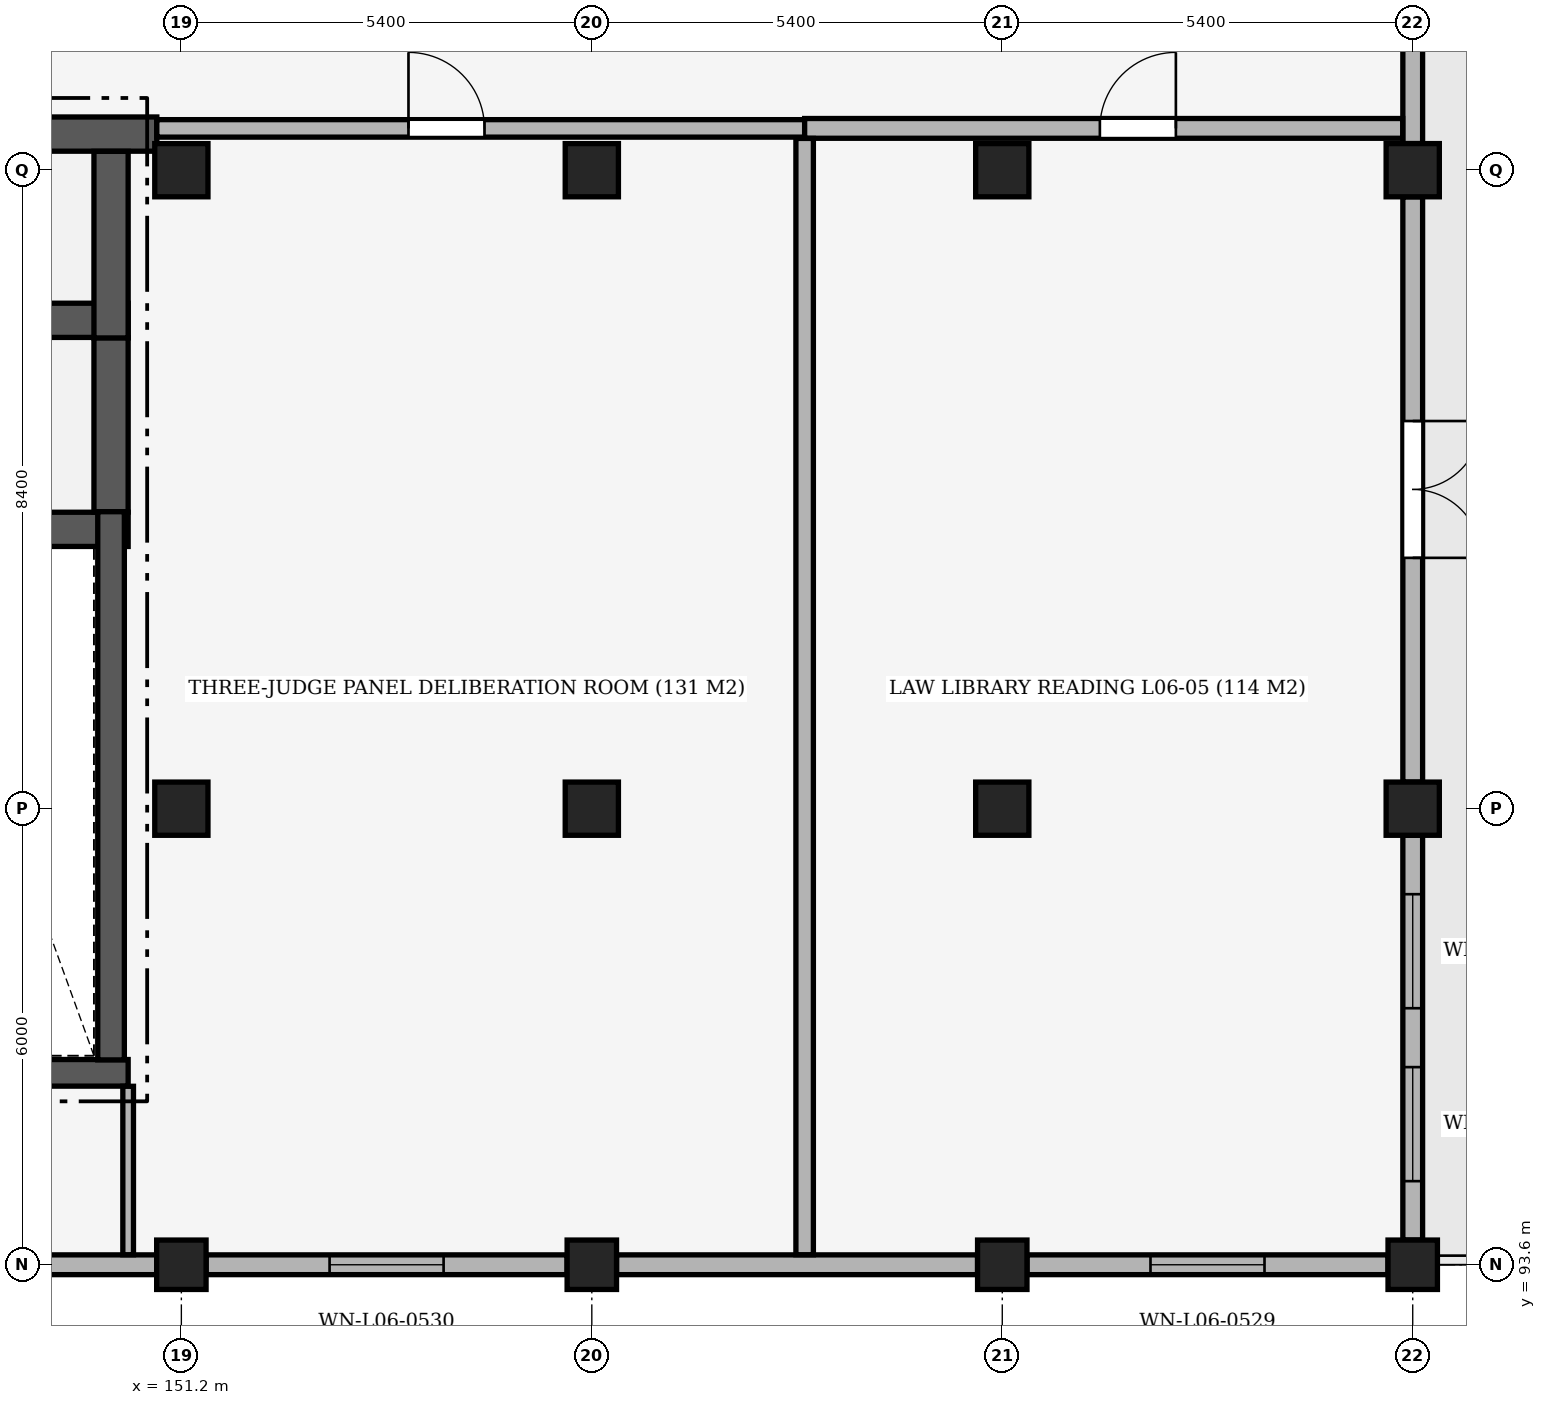
"""IFC4 building model, lengths in metres.
Left out: names, types, materials, properties, quantities, classifications, styles, units other than length and angle.
Written with IfcOpenShell. Run it as: python <this file> out.ifc"""

import sys

from ifc_helpers import new_model, si_unit, direction, frame, frame_2d, origin, origin_2d, place, context, subcontext, project, spatial, rectangle, extrude, element, fill, save


model = new_model("IFC4")
c1 = context("Model", 3, precision=1e-05, world=origin(), true_north=direction((0.0, 1.0)))
c2 = subcontext(c1, "Body", "Model", "MODEL_VIEW")
j1 = project(units=[si_unit("LENGTHUNIT", "METRE"), si_unit("PLANEANGLEUNIT", "RADIAN")], contexts=[c1])
p1 = place(None, origin())
s1 = spatial("IfcSite", under=j1, at=p1, CompositionType="ELEMENT")
p2 = place(p1, origin())
s2 = spatial("IfcBuilding", under=s1, at=p2, CompositionType="ELEMENT")
p3 = place(p2, frame((0.0, 0.0, 29.4)))
s3 = spatial("IfcBuildingStorey", under=s2, at=p3, CompositionType="ELEMENT", Elevation=29.4)
p4 = place(p3, frame((151.2, 93.6, 0.0), z_axis=(0.0, 0.0, 1.0), x_axis=(1.0, 0.0, 0.0)))
e1 = element("IfcColumn", 1, at=p4, inside=s3, PredefinedType="COLUMN", context=c2, shape_type="SweptSolid", body=[
    extrude(rectangle(XDim=0.65, YDim=0.65, at=origin_2d()), origin(), (0.0, 0.0, 1.0), 4.2),
])
for number, where, z_axis, x_axis in (
    (2, (151.2, 99.6, 0.0), (0.0, 0.0, 1.0), (1.0, 0.0, 0.0)),
    (3, (151.2, 108.0, 0.0), (0.0, 0.0, 1.0), (1.0, 0.0, 0.0)),
):
    element("IfcColumn", number, at=place(p3, frame(where, z_axis=z_axis, x_axis=x_axis)), inside=s3, PredefinedType="COLUMN", context=c2, shape_type="SweptSolid", body=[
        extrude(rectangle(XDim=0.7, YDim=0.7, at=origin_2d()), origin(), (0.0, 0.0, 1.0), 4.2),
    ])
p5 = place(p3, frame((156.6, 93.6, 0.0), z_axis=(0.0, 0.0, 1.0), x_axis=(1.0, 0.0, 0.0)))
e4 = element("IfcColumn", 4, at=p5, inside=s3, PredefinedType="COLUMN", context=c2, shape_type="SweptSolid", body=[
    extrude(rectangle(XDim=0.65, YDim=0.65, at=origin_2d()), origin(), (0.0, 0.0, 1.0), 4.2),
])
for number, where, z_axis, x_axis in (
    (5, (156.6, 99.6, 0.0), (0.0, 0.0, 1.0), (1.0, 0.0, 0.0)),
    (6, (156.6, 108.0, 0.0), (0.0, 0.0, 1.0), (1.0, 0.0, 0.0)),
):
    element("IfcColumn", number, at=place(p3, frame(where, z_axis=z_axis, x_axis=x_axis)), inside=s3, PredefinedType="COLUMN", context=c2, shape_type="SweptSolid", body=[
        extrude(rectangle(XDim=0.7, YDim=0.7, at=origin_2d()), origin(), (0.0, 0.0, 1.0), 4.2),
    ])
p6 = place(p3, frame((162.0, 93.6, 0.0), z_axis=(0.0, 0.0, 1.0), x_axis=(1.0, 0.0, 0.0)))
e7 = element("IfcColumn", 7, at=p6, inside=s3, PredefinedType="COLUMN", context=c2, shape_type="SweptSolid", body=[
    extrude(rectangle(XDim=0.65, YDim=0.65, at=origin_2d()), origin(), (0.0, 0.0, 1.0), 4.2),
])
for number, where, z_axis, x_axis in (
    (8, (162.0, 99.6, 0.0), (0.0, 0.0, 1.0), (1.0, 0.0, 0.0)),
    (9, (162.0, 108.0, 0.0), (0.0, 0.0, 1.0), (1.0, 0.0, 0.0)),
):
    element("IfcColumn", number, at=place(p3, frame(where, z_axis=z_axis, x_axis=x_axis)), inside=s3, PredefinedType="COLUMN", context=c2, shape_type="SweptSolid", body=[
        extrude(rectangle(XDim=0.7, YDim=0.7, at=origin_2d()), origin(), (0.0, 0.0, 1.0), 4.2),
    ])
p7 = place(p3, frame((167.4, 93.6, 0.0), z_axis=(0.0, 0.0, 1.0), x_axis=(1.0, 0.0, 0.0)))
e10 = element("IfcColumn", 10, at=p7, inside=s3, PredefinedType="COLUMN", context=c2, shape_type="SweptSolid", body=[
    extrude(rectangle(XDim=0.65, YDim=0.65, at=origin_2d()), origin(), (0.0, 0.0, 1.0), 4.2),
])
for number, where, z_axis, x_axis in (
    (11, (167.4, 99.6, 0.0), (0.0, 0.0, 1.0), (1.0, 0.0, 0.0)),
    (12, (167.4, 108.0, 0.0), (0.0, 0.0, 1.0), (1.0, 0.0, 0.0)),
):
    element("IfcColumn", number, at=place(p3, frame(where, z_axis=z_axis, x_axis=x_axis)), inside=s3, PredefinedType="COLUMN", context=c2, shape_type="SweptSolid", body=[
        extrude(rectangle(XDim=0.7, YDim=0.7, at=origin_2d()), origin(), (0.0, 0.0, 1.0), 4.2),
    ])
p8 = place(p3, frame((167.4, 113.05, 0.0), z_axis=(0.0, 0.0, 1.0), x_axis=(0.0, -1.0, 0.0)))
e13 = element("IfcWall", 13, at=p8, inside=s3, PredefinedType="SOLIDWALL", context=c2, shape_type="SweptSolid", body=[
    extrude(rectangle(XDim=4.7, YDim=0.26, at=frame_2d((2.35, 0.0))), origin(), (0.0, 0.0, 1.0), 3.4),
])
p9 = place(p3, frame((167.4, 107.65, 0.0), z_axis=(0.0, 0.0, 1.0), x_axis=(0.0, -1.0, 0.0)))
e14 = element("IfcWall", 14, at=p9, inside=s3, PredefinedType="SOLIDWALL", context=c2, shape_type="SweptSolid", body=[
    extrude(rectangle(XDim=7.7, YDim=0.26, at=frame_2d((3.85, 0.0))), origin(), (0.0, 0.0, 1.0), 3.25),
])
p10 = place(p9, frame((2.95, 0.0, 0.0)))
e15 = element("IfcOpeningElement", 15, at=p10, cuts=e14, PredefinedType="OPENING", context=c2, shape_type="SweptSolid", body=[
    extrude(rectangle(XDim=1.8, YDim=2.2, at=frame_2d((0.9, 1.1))), frame((0.0, 0.145, 0.0), z_axis=(0.0, -1.0, 0.0), x_axis=(1.0, 0.0, 0.0)), (0.0, 0.0, 1.0), 0.29),
])
p11 = place(p3, frame((167.4, 99.25, 0.0), z_axis=(0.0, 0.0, 1.0), x_axis=(0.0, -1.0, 0.0)))
e16 = element("IfcWall", 16, at=p11, inside=s3, PredefinedType="SOLIDWALL", context=c2, shape_type="SweptSolid", body=[
    extrude(rectangle(XDim=5.325, YDim=0.26, at=frame_2d((2.663, 0.0))), origin(), (0.0, 0.0, 1.0), 3.4),
])
p12 = place(p11, frame((0.775, 0.0, 0.9)))
e17 = element("IfcOpeningElement", 17, at=p12, cuts=e16, PredefinedType="OPENING", context=c2, shape_type="SweptSolid", body=[
    extrude(rectangle(XDim=1.5, YDim=2.1, at=frame_2d((0.75, 1.05))), frame((0.0, 0.145, 0.0), z_axis=(0.0, -1.0, 0.0), x_axis=(1.0, 0.0, 0.0)), (0.0, 0.0, 1.0), 0.29),
])
p13 = place(p11, frame((3.05, 0.0, 0.9)))
e18 = element("IfcOpeningElement", 18, at=p13, cuts=e16, PredefinedType="OPENING", context=c2, shape_type="SweptSolid", body=[
    extrude(rectangle(XDim=1.5, YDim=2.1, at=frame_2d((0.75, 1.05))), frame((0.0, 0.145, 0.0), z_axis=(0.0, -1.0, 0.0), x_axis=(1.0, 0.0, 0.0)), (0.0, 0.0, 1.0), 0.29),
])
p14 = place(p3, frame((167.075, 93.6, 0.0), z_axis=(0.0, 0.0, 1.0), x_axis=(-1.0, 0.0, 0.0)))
e19 = element("IfcWall", 19, at=p14, inside=s3, PredefinedType="SOLIDWALL", context=c2, shape_type="SweptSolid", body=[
    extrude(rectangle(XDim=4.75, YDim=0.26, at=frame_2d((2.375, 0.0))), origin(), (0.0, 0.0, 1.0), 3.35),
])
p15 = place(p14, frame((1.625, 0.0, 0.9)))
e20 = element("IfcOpeningElement", 20, at=p15, cuts=e19, PredefinedType="OPENING", context=c2, shape_type="SweptSolid", body=[
    extrude(rectangle(XDim=1.5, YDim=2.1, at=frame_2d((0.75, 1.05))), frame((0.0, 0.145, 0.0), z_axis=(0.0, -1.0, 0.0), x_axis=(1.0, 0.0, 0.0)), (0.0, 0.0, 1.0), 0.29),
])
p16 = place(p3, frame((161.675, 93.6, 0.0), z_axis=(0.0, 0.0, 1.0), x_axis=(-1.0, 0.0, 0.0)))
e21 = element("IfcWall", 21, at=p16, inside=s3, PredefinedType="SOLIDWALL", context=c2, shape_type="SweptSolid", body=[
    extrude(rectangle(XDim=4.75, YDim=0.26, at=frame_2d((2.375, 0.0))), origin(), (0.0, 0.0, 1.0), 3.35),
])
p17 = place(p3, frame((156.275, 93.6, 0.0), z_axis=(0.0, 0.0, 1.0), x_axis=(-1.0, 0.0, 0.0)))
e22 = element("IfcWall", 22, at=p17, inside=s3, PredefinedType="SOLIDWALL", context=c2, shape_type="SweptSolid", body=[
    extrude(rectangle(XDim=4.75, YDim=0.26, at=frame_2d((2.375, 0.0))), origin(), (0.0, 0.0, 1.0), 3.35),
])
p18 = place(p17, frame((1.625, 0.0, 0.9)))
e23 = element("IfcOpeningElement", 23, at=p18, cuts=e22, PredefinedType="OPENING", context=c2, shape_type="SweptSolid", body=[
    extrude(rectangle(XDim=1.5, YDim=2.1, at=frame_2d((0.75, 1.05))), frame((0.0, 0.145, 0.0), z_axis=(0.0, -1.0, 0.0), x_axis=(1.0, 0.0, 0.0)), (0.0, 0.0, 1.0), 0.29),
])
p19 = place(p3, frame((150.875, 93.6, 0.0), z_axis=(0.0, 0.0, 1.0), x_axis=(-1.0, 0.0, 0.0)))
e24 = element("IfcWall", 24, at=p19, inside=s3, PredefinedType="SOLIDWALL", context=c2, shape_type="SweptSolid", body=[
    extrude(rectangle(XDim=7.75, YDim=0.26, at=frame_2d((3.875, 0.0))), origin(), (0.0, 0.0, 1.0), 3.25),
])
p20 = place(p19, frame((1.517, 0.0, 1.05)))
e25 = element("IfcOpeningElement", 25, at=p20, cuts=e24, PredefinedType="OPENING", context=c2, shape_type="SweptSolid", body=[
    extrude(rectangle(XDim=1.6, YDim=1.8, at=frame_2d((0.8, 0.9))), frame((0.0, 0.145, 0.0), z_axis=(0.0, -1.0, 0.0), x_axis=(1.0, 0.0, 0.0)), (0.0, 0.0, 1.0), 0.29),
])
p21 = place(p19, frame((4.633, 0.0, 1.05)))
e26 = element("IfcOpeningElement", 26, at=p21, cuts=e24, PredefinedType="OPENING", context=c2, shape_type="SweptSolid", body=[
    extrude(rectangle(XDim=1.6, YDim=1.8, at=frame_2d((0.8, 0.9))), frame((0.0, 0.145, 0.0), z_axis=(0.0, -1.0, 0.0), x_axis=(1.0, 0.0, 0.0)), (0.0, 0.0, 1.0), 0.29),
])
p22 = place(p3, frame((147.618, 103.275, 0.0), z_axis=(0.0, 0.0, 1.0), x_axis=(1.0, 0.0, 0.0)))
e27 = element("IfcWall", 27, at=p22, inside=s3, PredefinedType="SHEAR", context=c2, shape_type="SweptSolid", body=[
    extrude(rectangle(XDim=2.882, YDim=0.45, at=frame_2d((1.441, 0.0))), origin(), (0.0, 0.0, 1.0), 3.95),
])
p23 = place(p3, frame((147.1, 106.025, 0.0), z_axis=(0.0, 0.0, 1.0), x_axis=(1.0, 0.0, 0.0)))
e28 = element("IfcWall", 28, at=p23, inside=s3, PredefinedType="SHEAR", context=c2, shape_type="SweptSolid", body=[
    extrude(rectangle(XDim=3.4, YDim=0.45, at=frame_2d((1.7, 0.0))), origin(), (0.0, 0.0, 1.0), 3.95),
])
p24 = place(p3, frame((150.275, 103.502, 0.0), z_axis=(0.0, 0.0, 1.0), x_axis=(0.0, 1.0, 0.0)))
e29 = element("IfcWall", 29, at=p24, inside=s3, PredefinedType="SHEAR", context=c2, shape_type="SweptSolid", body=[
    extrude(rectangle(XDim=2.296, YDim=0.45, at=frame_2d((1.148, 0.0))), origin(), (0.0, 0.0, 1.0), 3.95),
])
p25 = place(p3, frame((147.1, 108.475, 0.0), z_axis=(0.0, 0.0, 1.0), x_axis=(1.0, 0.0, 0.0)))
e30 = element("IfcWall", 30, at=p25, inside=s3, PredefinedType="SHEAR", context=c2, shape_type="SweptSolid", body=[
    extrude(rectangle(XDim=3.777, YDim=0.45, at=frame_2d((1.888, 0.0))), origin(), (0.0, 0.0, 1.0), 3.95),
])
p26 = place(p3, frame((150.275, 105.793, 0.0), z_axis=(0.0, 0.0, 1.0), x_axis=(0.0, 1.0, 0.0)))
e31 = element("IfcWall", 31, at=p26, inside=s3, PredefinedType="SHEAR", context=c2, shape_type="SweptSolid", body=[
    extrude(rectangle(XDim=2.455, YDim=0.45, at=frame_2d((1.228, 0.0))), origin(), (0.0, 0.0, 1.0), 3.95),
])
p27 = place(p3, frame((147.65, 96.125, 0.0), z_axis=(0.0, 0.0, 1.0), x_axis=(1.0, 0.0, 0.0)))
e32 = element("IfcWall", 32, at=p27, inside=s3, PredefinedType="SHEAR", context=c2, shape_type="SweptSolid", body=[
    extrude(rectangle(XDim=2.85, YDim=0.35, at=frame_2d((1.425, 0.0))), origin(), (0.0, 0.0, 1.0), 3.95),
])
p28 = place(p3, frame((150.275, 96.295, 0.0), z_axis=(0.0, 0.0, 1.0), x_axis=(0.0, 1.0, 0.0)))
e33 = element("IfcWall", 33, at=p28, inside=s3, PredefinedType="SHEAR", context=c2, shape_type="SweptSolid", body=[
    extrude(rectangle(XDim=7.212, YDim=0.35, at=frame_2d((3.606, 0.0))), origin(), (0.0, 0.0, 1.0), 3.95),
])
p29 = place(p3, frame((150.877, 108.55, 0.0), z_axis=(0.0, 0.0, 1.0), x_axis=(1.0, 0.0, 0.0)))
e34 = element("IfcWall", 34, at=p29, inside=s3, PredefinedType="SOLIDWALL", context=c2, shape_type="SweptSolid", body=[
    extrude(rectangle(XDim=8.523, YDim=0.23, at=frame_2d((4.261, 0.0))), origin(), (0.0, 0.0, 1.0), 3.4),
])
p30 = place(p29, frame((3.311, 0.0, 0.0)))
e35 = element("IfcOpeningElement", 35, at=p30, cuts=e34, PredefinedType="OPENING", context=c2, shape_type="SweptSolid", body=[
    extrude(rectangle(XDim=1.0, YDim=2.2, at=frame_2d((0.5, 1.1))), frame((0.0, 0.13, 0.0), z_axis=(0.0, -1.0, 0.0), x_axis=(1.0, 0.0, 0.0)), (0.0, 0.0, 1.0), 0.26),
])
p31 = place(p3, frame((159.4, 108.55, 0.0), z_axis=(0.0, 0.0, 1.0), x_axis=(1.0, 0.0, 0.0)))
e36 = element("IfcWall", 36, at=p31, inside=s3, PredefinedType="PARTITIONING", context=c2, shape_type="SweptSolid", body=[
    extrude(rectangle(XDim=7.868, YDim=0.26, at=frame_2d((3.934, 0.0))), origin(), (0.0, 0.0, 1.0), 3.4),
])
p32 = place(p31, frame((3.884, 0.0, 0.0)))
e37 = element("IfcOpeningElement", 37, at=p32, cuts=e36, PredefinedType="OPENING", context=c2, shape_type="SweptSolid", body=[
    extrude(rectangle(XDim=1.0, YDim=2.1, at=frame_2d((0.5, 1.05))), frame((0.0, 0.145, 0.0), z_axis=(0.0, -1.0, 0.0), x_axis=(1.0, 0.0, 0.0)), (0.0, 0.0, 1.0), 0.29),
])
p33 = place(p3, frame((150.5, 93.732, 0.0), z_axis=(0.0, 0.0, 1.0), x_axis=(0.0, 1.0, 0.0)))
e38 = element("IfcWall", 38, at=p33, inside=s3, PredefinedType="PARTITIONING", context=c2, shape_type="SweptSolid", body=[
    extrude(rectangle(XDim=2.216, YDim=0.14, at=frame_2d((1.108, 0.0))), origin(), (0.0, 0.0, 1.0), 3.25),
])
p34 = place(p3, frame((159.4, 93.732, 0.0), z_axis=(0.0, 0.0, 1.0), x_axis=(0.0, 1.0, 0.0)))
e39 = element("IfcWall", 39, at=p34, inside=s3, PredefinedType="SOLIDWALL", context=c2, shape_type="SweptSolid", body=[
    extrude(rectangle(XDim=14.686, YDim=0.23, at=frame_2d((7.343, 0.0))), origin(), (0.0, 0.0, 1.0), 3.35),
])
p35 = place(p10, origin())
e40 = element("IfcDoor", 40, at=p35, inside=s3, OperationType="DOUBLE_DOOR_SINGLE_SWING", PredefinedType="DOOR", context=c2, shape_type="SweptSolid", body=[
    extrude(rectangle(XDim=1.8, YDim=2.2, at=frame_2d((0.9, 1.1))), frame((0.0, 0.025, 0.0), z_axis=(0.0, -1.0, 0.0), x_axis=(1.0, 0.0, 0.0)), (0.0, 0.0, 1.0), 0.05),
])
fill(e15, e40)
p36 = place(p12, origin())
e41 = element("IfcWindow", 41, at=p36, inside=s3, PartitioningType="SINGLE_PANEL", PredefinedType="WINDOW", context=c2, shape_type="SweptSolid", body=[
    extrude(rectangle(XDim=1.5, YDim=2.1, at=frame_2d((0.75, 1.05))), frame((0.0, 0.03, 0.0), z_axis=(0.0, -1.0, 0.0), x_axis=(1.0, 0.0, 0.0)), (0.0, 0.0, 1.0), 0.06),
])
fill(e17, e41)
p37 = place(p13, origin())
e42 = element("IfcWindow", 42, at=p37, inside=s3, PartitioningType="SINGLE_PANEL", PredefinedType="WINDOW", context=c2, shape_type="SweptSolid", body=[
    extrude(rectangle(XDim=1.5, YDim=2.1, at=frame_2d((0.75, 1.05))), frame((0.0, 0.03, 0.0), z_axis=(0.0, -1.0, 0.0), x_axis=(1.0, 0.0, 0.0)), (0.0, 0.0, 1.0), 0.06),
])
fill(e18, e42)
p38 = place(p15, origin())
e43 = element("IfcWindow", 43, at=p38, inside=s3, PartitioningType="SINGLE_PANEL", PredefinedType="WINDOW", context=c2, shape_type="SweptSolid", body=[
    extrude(rectangle(XDim=1.5, YDim=2.1, at=frame_2d((0.75, 1.05))), frame((0.0, 0.03, 0.0), z_axis=(0.0, -1.0, 0.0), x_axis=(1.0, 0.0, 0.0)), (0.0, 0.0, 1.0), 0.06),
])
fill(e20, e43)
p39 = place(p18, origin())
e44 = element("IfcWindow", 44, at=p39, inside=s3, PartitioningType="SINGLE_PANEL", PredefinedType="WINDOW", context=c2, shape_type="SweptSolid", body=[
    extrude(rectangle(XDim=1.5, YDim=2.1, at=frame_2d((0.75, 1.05))), frame((0.0, 0.03, 0.0), z_axis=(0.0, -1.0, 0.0), x_axis=(1.0, 0.0, 0.0)), (0.0, 0.0, 1.0), 0.06),
])
fill(e23, e44)
p40 = place(p30, origin())
e45 = element("IfcDoor", 45, at=p40, inside=s3, OperationType="SINGLE_SWING_LEFT", PredefinedType="DOOR", context=c2, shape_type="SweptSolid", body=[
    extrude(rectangle(XDim=1.0, YDim=2.2, at=frame_2d((0.5, 1.1))), frame((0.0, 0.025, 0.0), z_axis=(0.0, -1.0, 0.0), x_axis=(1.0, 0.0, 0.0)), (0.0, 0.0, 1.0), 0.05),
])
fill(e35, e45)
p41 = place(p32, origin())
e46 = element("IfcDoor", 46, at=p41, inside=s3, OperationType="SINGLE_SWING_RIGHT", PredefinedType="DOOR", context=c2, shape_type="SweptSolid", body=[
    extrude(rectangle(XDim=1.0, YDim=2.1, at=frame_2d((0.5, 1.05))), frame((0.0, 0.025, 0.0), z_axis=(0.0, -1.0, 0.0), x_axis=(1.0, 0.0, 0.0)), (0.0, 0.0, 1.0), 0.05),
])
fill(e37, e46)
save(model, sys.argv[1])
